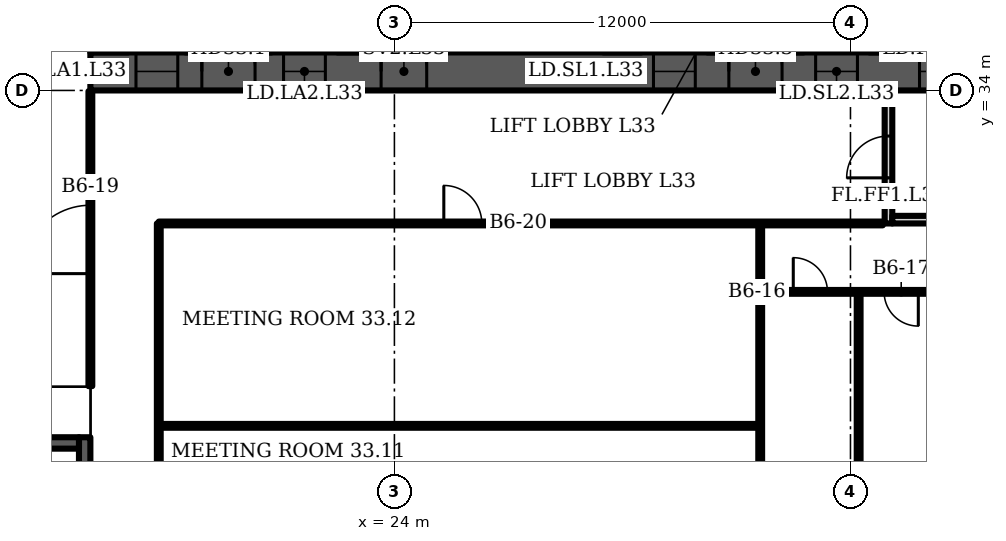
"""IFC4 building model, lengths in metres.
Left out: names, types, materials, properties, quantities, classifications, styles, units other than length and angle.
Written with IfcOpenShell. Run it as: python <this file> out.ifc"""

import sys

from ifc_helpers import new_model, si_unit, direction, frame, frame_2d, origin, place, context, subcontext, project, spatial, rectangle, extrude, element, fill, save


model = new_model("IFC4")
c1 = context("Model", 3, precision=1e-05, world=origin(), true_north=direction((0.0, 1.0)))
c2 = subcontext(c1, "Body", "Model", "MODEL_VIEW")
j1 = project(units=[si_unit("LENGTHUNIT", "METRE"), si_unit("PLANEANGLEUNIT", "RADIAN")], contexts=[c1])
p1 = place(None, origin())
s1 = spatial("IfcSite", under=j1, at=p1, CompositionType="ELEMENT")
p2 = place(p1, origin())
s2 = spatial("IfcBuilding", under=s1, at=p2, CompositionType="ELEMENT")
p3 = place(p2, frame((0.0, 0.0, 139.9)))
s3 = spatial("IfcBuildingStorey", under=s2, at=p3, CompositionType="ELEMENT", Elevation=139.9)
p4 = place(p3, frame((16.0, 34.5, 0.0), z_axis=(0.0, 0.0, 1.0), x_axis=(1.0, 0.0, 0.0)))
e1 = element("IfcWall", 1, at=p4, inside=s3, PredefinedType="SHEAR", context=c2, shape_type="SweptSolid", body=[
    extrude(rectangle(XDim=49.0, YDim=1.0, at=frame_2d((24.5, 0.0))), origin(), (0.0, 0.0, 1.0), 3.6),
])
p5 = place(p4, frame((1.2, 0.0, 0.0)))
e2 = element("IfcOpeningElement", 2, at=p5, cuts=e1, PredefinedType="OPENING", context=c2, shape_type="SweptSolid", body=[
    extrude(rectangle(XDim=1.1, YDim=2.1, at=frame_2d((0.55, 1.05))), frame((0.0, 0.51, 0.0), z_axis=(0.0, -1.0, 0.0), x_axis=(1.0, 0.0, 0.0)), (0.0, 0.0, 1.0), 1.02),
])
p6 = place(p4, frame((5.083, 0.0, 0.0)))
e3 = element("IfcOpeningElement", 3, at=p6, cuts=e1, PredefinedType="OPENING", context=c2, shape_type="SweptSolid", body=[
    extrude(rectangle(XDim=1.1, YDim=2.1, at=frame_2d((0.55, 1.05))), frame((0.0, 0.51, 0.0), z_axis=(0.0, -1.0, 0.0), x_axis=(1.0, 0.0, 0.0)), (0.0, 0.0, 1.0), 1.02),
])
p7 = place(p4, frame((2.933, 0.0, 0.0)))
e4 = element("IfcOpeningElement", 4, at=p7, cuts=e1, PredefinedType="OPENING", context=c2, shape_type="SweptSolid", body=[
    extrude(rectangle(XDim=1.4, YDim=2.1, at=frame_2d((0.7, 1.05))), frame((0.0, 0.51, 0.0), z_axis=(0.0, -1.0, 0.0), x_axis=(1.0, 0.0, 0.0)), (0.0, 0.0, 1.0), 1.02),
])
p8 = place(p4, frame((7.65, 0.0, 0.0)))
e5 = element("IfcOpeningElement", 5, at=p8, cuts=e1, PredefinedType="OPENING", context=c2, shape_type="SweptSolid", body=[
    extrude(rectangle(XDim=1.2, YDim=2.1, at=frame_2d((0.6, 1.05))), frame((0.0, 0.51, 0.0), z_axis=(0.0, -1.0, 0.0), x_axis=(1.0, 0.0, 0.0)), (0.0, 0.0, 1.0), 1.02),
])
p9 = place(p4, frame((14.817, 0.0, 0.0)))
e6 = element("IfcOpeningElement", 6, at=p9, cuts=e1, PredefinedType="OPENING", context=c2, shape_type="SweptSolid", body=[
    extrude(rectangle(XDim=1.1, YDim=2.1, at=frame_2d((0.55, 1.05))), frame((0.0, 0.51, 0.0), z_axis=(0.0, -1.0, 0.0), x_axis=(1.0, 0.0, 0.0)), (0.0, 0.0, 1.0), 1.02),
])
p10 = place(p4, frame((19.083, 0.0, 0.0)))
e7 = element("IfcOpeningElement", 7, at=p10, cuts=e1, PredefinedType="OPENING", context=c2, shape_type="SweptSolid", body=[
    extrude(rectangle(XDim=1.1, YDim=2.1, at=frame_2d((0.55, 1.05))), frame((0.0, 0.51, 0.0), z_axis=(0.0, -1.0, 0.0), x_axis=(1.0, 0.0, 0.0)), (0.0, 0.0, 1.0), 1.02),
])
p11 = place(p4, frame((16.8, 0.0, 0.0)))
e8 = element("IfcOpeningElement", 8, at=p11, cuts=e1, PredefinedType="OPENING", context=c2, shape_type="SweptSolid", body=[
    extrude(rectangle(XDim=1.4, YDim=2.1, at=frame_2d((0.7, 1.05))), frame((0.0, 0.51, 0.0), z_axis=(0.0, -1.0, 0.0), x_axis=(1.0, 0.0, 0.0)), (0.0, 0.0, 1.0), 1.02),
])
p12 = place(p4, frame((21.817, 0.0, 0.0)))
e9 = element("IfcOpeningElement", 9, at=p12, cuts=e1, PredefinedType="OPENING", context=c2, shape_type="SweptSolid", body=[
    extrude(rectangle(XDim=1.1, YDim=2.1, at=frame_2d((0.55, 1.05))), frame((0.0, 0.51, 0.0), z_axis=(0.0, -1.0, 0.0), x_axis=(1.0, 0.0, 0.0)), (0.0, 0.0, 1.0), 1.02),
])
p13 = place(p4, frame((26.083, 0.0, 0.0)))
e10 = element("IfcOpeningElement", 10, at=p13, cuts=e1, PredefinedType="OPENING", context=c2, shape_type="SweptSolid", body=[
    extrude(rectangle(XDim=1.1, YDim=2.1, at=frame_2d((0.55, 1.05))), frame((0.0, 0.51, 0.0), z_axis=(0.0, -1.0, 0.0), x_axis=(1.0, 0.0, 0.0)), (0.0, 0.0, 1.0), 1.02),
])
p14 = place(p4, frame((33.15, 0.0, 0.0)))
e11 = element("IfcOpeningElement", 11, at=p14, cuts=e1, PredefinedType="OPENING", context=c2, shape_type="SweptSolid", body=[
    extrude(rectangle(XDim=1.2, YDim=2.1, at=frame_2d((0.6, 1.05))), frame((0.0, 0.51, 0.0), z_axis=(0.0, -1.0, 0.0), x_axis=(1.0, 0.0, 0.0)), (0.0, 0.0, 1.0), 1.02),
])
p15 = place(p4, frame((37.8, 0.0, 0.0)))
e12 = element("IfcOpeningElement", 12, at=p15, cuts=e1, PredefinedType="OPENING", context=c2, shape_type="SweptSolid", body=[
    extrude(rectangle(XDim=1.4, YDim=2.1, at=frame_2d((0.7, 1.05))), frame((0.0, 0.51, 0.0), z_axis=(0.0, -1.0, 0.0), x_axis=(1.0, 0.0, 0.0)), (0.0, 0.0, 1.0), 1.02),
])
p16 = place(p4, frame((42.817, 0.0, 0.0)))
e13 = element("IfcOpeningElement", 13, at=p16, cuts=e1, PredefinedType="OPENING", context=c2, shape_type="SweptSolid", body=[
    extrude(rectangle(XDim=1.1, YDim=2.1, at=frame_2d((0.55, 1.05))), frame((0.0, 0.51, 0.0), z_axis=(0.0, -1.0, 0.0), x_axis=(1.0, 0.0, 0.0)), (0.0, 0.0, 1.0), 1.02),
])
p17 = place(p4, frame((46.7, 0.0, 0.0)))
e14 = element("IfcOpeningElement", 14, at=p17, cuts=e1, PredefinedType="OPENING", context=c2, shape_type="SweptSolid", body=[
    extrude(rectangle(XDim=1.1, YDim=2.1, at=frame_2d((0.55, 1.05))), frame((0.0, 0.51, 0.0), z_axis=(0.0, -1.0, 0.0), x_axis=(1.0, 0.0, 0.0)), (0.0, 0.0, 1.0), 1.02),
])
p18 = place(p4, frame((44.667, 0.0, 0.0)))
e15 = element("IfcOpeningElement", 15, at=p18, cuts=e1, PredefinedType="OPENING", context=c2, shape_type="SweptSolid", body=[
    extrude(rectangle(XDim=1.4, YDim=2.1, at=frame_2d((0.7, 1.05))), frame((0.0, 0.51, 0.0), z_axis=(0.0, -1.0, 0.0), x_axis=(1.0, 0.0, 0.0)), (0.0, 0.0, 1.0), 1.02),
])
p19 = place(p3, frame((37.0, 30.5, 0.0), z_axis=(0.0, 0.0, 1.0), x_axis=(0.0, 1.0, 0.0)))
e16 = element("IfcWall", 16, at=p19, inside=s3, PredefinedType="PARTITIONING", context=c2, shape_type="SweptSolid", body=[
    extrude(rectangle(XDim=3.5, YDim=0.2, at=frame_2d((1.75, 0.0))), origin(), (0.0, 0.0, 1.0), 3.2),
])
p20 = place(p19, frame((1.2, 0.0, 0.0)))
e17 = element("IfcOpeningElement", 17, at=p20, cuts=e16, PredefinedType="OPENING", context=c2, shape_type="SweptSolid", body=[
    extrude(rectangle(XDim=1.1, YDim=2.1, at=frame_2d((0.55, 1.05))), frame((0.0, 0.11, 0.0), z_axis=(0.0, -1.0, 0.0), x_axis=(1.0, 0.0, 0.0)), (0.0, 0.0, 1.0), 0.22),
])
p21 = place(p3, frame((37.1, 30.6, 0.0), z_axis=(0.0, 0.0, 1.0), x_axis=(1.0, 0.0, 0.0)))
e18 = element("IfcWall", 18, at=p21, inside=s3, PredefinedType="PARTITIONING", context=c2, shape_type="SweptSolid", body=[
    extrude(rectangle(XDim=2.8, YDim=0.2, at=frame_2d((1.4, 0.0))), origin(), (0.0, 0.0, 1.0), 3.2),
])
p22 = place(p3, frame((15.85, 20.525, 0.0), z_axis=(0.0, 0.0, 1.0), x_axis=(0.0, 1.0, 0.0)))
e19 = element("IfcWall", 19, at=p22, inside=s3, PredefinedType="SHEAR", context=c2, shape_type="SweptSolid", body=[
    extrude(rectangle(XDim=4.35, YDim=0.3, at=frame_2d((2.175, 0.0))), origin(), (0.0, 0.0, 1.0), 3.2),
])
p23 = place(p22, frame((1.575, 0.0, 0.0)))
e20 = element("IfcOpeningElement", 20, at=p23, cuts=e19, PredefinedType="OPENING", context=c2, shape_type="SweptSolid", body=[
    extrude(rectangle(XDim=1.2, YDim=2.1, at=frame_2d((0.6, 1.05))), frame((0.0, 0.16, 0.0), z_axis=(0.0, -1.0, 0.0), x_axis=(1.0, 0.0, 0.0)), (0.0, 0.0, 1.0), 0.32),
])
p24 = place(p3, frame((16.0, 26.22, 0.0), z_axis=(0.0, 0.0, 1.0), x_axis=(0.0, 1.0, 0.0)))
e21 = element("IfcWall", 21, at=p24, inside=s3, PredefinedType="PARTITIONING", context=c2, shape_type="SweptSolid", body=[
    extrude(rectangle(XDim=7.76, YDim=0.1, at=frame_2d((3.88, 0.0))), origin(), (0.0, 0.0, 1.0), 3.2),
])
p25 = place(p24, frame((2.96, 0.0, 0.0)))
e22 = element("IfcOpeningElement", 22, at=p25, cuts=e21, PredefinedType="OPENING", context=c2, shape_type="SweptSolid", body=[
    extrude(rectangle(XDim=1.8, YDim=2.1, at=frame_2d((0.9, 1.05))), frame((0.0, 0.06, 0.0), z_axis=(0.0, -1.0, 0.0), x_axis=(1.0, 0.0, 0.0)), (0.0, 0.0, 1.0), 0.12),
])
p26 = place(p3, frame((17.8, 23.935, 0.0), z_axis=(0.0, 0.0, 1.0), x_axis=(0.0, 1.0, 0.0)))
e23 = element("IfcWall", 23, at=p26, inside=s3, PredefinedType="PARTITIONING", context=c2, shape_type="SweptSolid", body=[
    extrude(rectangle(XDim=6.565, YDim=0.1, at=frame_2d((3.282, 0.0))), origin(), (0.0, 0.0, 1.0), 3.2),
])
p27 = place(p3, frame((17.8, 25.175, 0.0), z_axis=(0.0, 0.0, 1.0), x_axis=(1.0, 0.0, 0.0)))
e24 = element("IfcWall", 24, at=p27, inside=s3, PredefinedType="PARTITIONING", context=c2, shape_type="SweptSolid", body=[
    extrude(rectangle(XDim=15.825, YDim=0.1, at=frame_2d((7.913, 0.0))), origin(), (0.0, 0.0, 1.0), 3.2),
])
p28 = place(p3, frame((17.8, 30.5, 0.0), z_axis=(0.0, 0.0, 1.0), x_axis=(1.0, 0.0, 0.0)))
e25 = element("IfcWall", 25, at=p28, inside=s3, PredefinedType="PARTITIONING", context=c2, shape_type="SweptSolid", body=[
    extrude(rectangle(XDim=19.05, YDim=0.1, at=frame_2d((9.525, 0.0))), origin(), (0.0, 0.0, 1.0), 3.2),
])
p29 = place(p28, frame((7.5, 0.0, 0.0)))
e26 = element("IfcOpeningElement", 26, at=p29, cuts=e25, PredefinedType="OPENING", context=c2, shape_type="SweptSolid", body=[
    extrude(rectangle(XDim=1.0, YDim=2.1, at=frame_2d((0.5, 1.05))), frame((0.0, 0.06, 0.0), z_axis=(0.0, -1.0, 0.0), x_axis=(1.0, 0.0, 0.0)), (0.0, 0.0, 1.0), 0.12),
])
p30 = place(p3, frame((33.625, 14.53, 0.0), z_axis=(0.0, 0.0, 1.0), x_axis=(0.0, 1.0, 0.0)))
e27 = element("IfcWall", 27, at=p30, inside=s3, PredefinedType="PARTITIONING", context=c2, shape_type="SweptSolid", body=[
    extrude(rectangle(XDim=15.96, YDim=0.1, at=frame_2d((7.98, 0.0))), origin(), (0.0, 0.0, 1.0), 3.2),
])
p31 = place(p3, frame((33.625, 28.7, 0.0), z_axis=(0.0, 0.0, 1.0), x_axis=(1.0, 0.0, 0.0)))
e28 = element("IfcWall", 28, at=p31, inside=s3, PredefinedType="PARTITIONING", context=c2, shape_type="SweptSolid", body=[
    extrude(rectangle(XDim=6.875, YDim=0.1, at=frame_2d((3.438, 0.0))), origin(), (0.0, 0.0, 1.0), 3.2),
])
p32 = place(p31, frame((0.87, 0.0, 0.0)))
e29 = element("IfcOpeningElement", 29, at=p32, cuts=e28, PredefinedType="OPENING", context=c2, shape_type="SweptSolid", body=[
    extrude(rectangle(XDim=0.9, YDim=2.1, at=frame_2d((0.45, 1.05))), frame((0.0, 0.06, 0.0), z_axis=(0.0, -1.0, 0.0), x_axis=(1.0, 0.0, 0.0)), (0.0, 0.0, 1.0), 0.12),
])
p33 = place(p31, frame((3.26, 0.0, 0.0)))
e30 = element("IfcOpeningElement", 30, at=p33, cuts=e28, PredefinedType="OPENING", context=c2, shape_type="SweptSolid", body=[
    extrude(rectangle(XDim=0.9, YDim=2.1, at=frame_2d((0.45, 1.05))), frame((0.0, 0.06, 0.0), z_axis=(0.0, -1.0, 0.0), x_axis=(1.0, 0.0, 0.0)), (0.0, 0.0, 1.0), 0.12),
])
p34 = place(p31, frame((5.395, 0.0, 0.0)))
e31 = element("IfcOpeningElement", 31, at=p34, cuts=e28, PredefinedType="OPENING", context=c2, shape_type="SweptSolid", body=[
    extrude(rectangle(XDim=1.0, YDim=2.1, at=frame_2d((0.5, 1.05))), frame((0.0, 0.06, 0.0), z_axis=(0.0, -1.0, 0.0), x_axis=(1.0, 0.0, 0.0)), (0.0, 0.0, 1.0), 0.12),
])
p35 = place(p3, frame((36.215, 14.53, 0.0), z_axis=(0.0, 0.0, 1.0), x_axis=(0.0, 1.0, 0.0)))
e32 = element("IfcWall", 32, at=p35, inside=s3, PredefinedType="PARTITIONING", context=c2, shape_type="SweptSolid", body=[
    extrude(rectangle(XDim=14.17, YDim=0.1, at=frame_2d((7.085, 0.0))), origin(), (0.0, 0.0, 1.0), 3.2),
])
p36 = place(p3, frame((8.2, 24.725, 0.0), z_axis=(0.0, 0.0, 1.0), x_axis=(1.0, 0.0, 0.0)))
e33 = element("IfcWall", 33, at=p36, inside=s3, PredefinedType="SHEAR", context=c2, shape_type="SweptSolid", body=[
    extrude(rectangle(XDim=7.5, YDim=0.3, at=frame_2d((3.75, 0.0))), origin(), (0.0, 0.0, 1.0), 3.2),
])
p37 = place(p5, origin())
e34 = element("IfcDoor", 34, at=p37, inside=s3, OperationType="DOUBLE_DOOR_SLIDING", PredefinedType="DOOR", context=c2, shape_type="SweptSolid", body=[
    extrude(rectangle(XDim=1.1, YDim=2.1, at=frame_2d((0.55, 1.05))), frame((0.0, 0.025, 0.0), z_axis=(0.0, -1.0, 0.0), x_axis=(1.0, 0.0, 0.0)), (0.0, 0.0, 1.0), 0.05),
])
fill(e2, e34)
p38 = place(p6, origin())
e35 = element("IfcDoor", 35, at=p38, inside=s3, OperationType="DOUBLE_DOOR_SLIDING", PredefinedType="DOOR", context=c2, shape_type="SweptSolid", body=[
    extrude(rectangle(XDim=1.1, YDim=2.1, at=frame_2d((0.55, 1.05))), frame((0.0, 0.025, 0.0), z_axis=(0.0, -1.0, 0.0), x_axis=(1.0, 0.0, 0.0)), (0.0, 0.0, 1.0), 0.05),
])
fill(e3, e35)
p39 = place(p7, origin())
e36 = element("IfcDoor", 36, at=p39, inside=s3, OperationType="DOUBLE_DOOR_SINGLE_SWING", PredefinedType="DOOR", context=c2, shape_type="SweptSolid", body=[
    extrude(rectangle(XDim=1.4, YDim=2.1, at=frame_2d((0.7, 1.05))), frame((0.0, 0.025, 0.0), z_axis=(0.0, -1.0, 0.0), x_axis=(1.0, 0.0, 0.0)), (0.0, 0.0, 1.0), 0.05),
])
fill(e4, e36)
p40 = place(p8, origin())
e37 = element("IfcDoor", 37, at=p40, inside=s3, OperationType="SINGLE_SWING_LEFT", PredefinedType="DOOR", context=c2, shape_type="SweptSolid", body=[
    extrude(rectangle(XDim=1.2, YDim=2.1, at=frame_2d((0.6, 1.05))), frame((0.0, 0.025, 0.0), z_axis=(0.0, -1.0, 0.0), x_axis=(1.0, 0.0, 0.0)), (0.0, 0.0, 1.0), 0.05),
])
fill(e5, e37)
p41 = place(p9, origin())
e38 = element("IfcDoor", 38, at=p41, inside=s3, OperationType="DOUBLE_DOOR_SLIDING", PredefinedType="DOOR", context=c2, shape_type="SweptSolid", body=[
    extrude(rectangle(XDim=1.1, YDim=2.1, at=frame_2d((0.55, 1.05))), frame((0.0, 0.025, 0.0), z_axis=(0.0, -1.0, 0.0), x_axis=(1.0, 0.0, 0.0)), (0.0, 0.0, 1.0), 0.05),
])
fill(e6, e38)
p42 = place(p10, origin())
e39 = element("IfcDoor", 39, at=p42, inside=s3, OperationType="DOUBLE_DOOR_SLIDING", PredefinedType="DOOR", context=c2, shape_type="SweptSolid", body=[
    extrude(rectangle(XDim=1.1, YDim=2.1, at=frame_2d((0.55, 1.05))), frame((0.0, 0.025, 0.0), z_axis=(0.0, -1.0, 0.0), x_axis=(1.0, 0.0, 0.0)), (0.0, 0.0, 1.0), 0.05),
])
fill(e7, e39)
p43 = place(p11, origin())
e40 = element("IfcDoor", 40, at=p43, inside=s3, OperationType="DOUBLE_DOOR_SINGLE_SWING", PredefinedType="DOOR", context=c2, shape_type="SweptSolid", body=[
    extrude(rectangle(XDim=1.4, YDim=2.1, at=frame_2d((0.7, 1.05))), frame((0.0, 0.025, 0.0), z_axis=(0.0, -1.0, 0.0), x_axis=(1.0, 0.0, 0.0)), (0.0, 0.0, 1.0), 0.05),
])
fill(e8, e40)
p44 = place(p12, origin())
e41 = element("IfcDoor", 41, at=p44, inside=s3, OperationType="DOUBLE_DOOR_SLIDING", PredefinedType="DOOR", context=c2, shape_type="SweptSolid", body=[
    extrude(rectangle(XDim=1.1, YDim=2.1, at=frame_2d((0.55, 1.05))), frame((0.0, 0.025, 0.0), z_axis=(0.0, -1.0, 0.0), x_axis=(1.0, 0.0, 0.0)), (0.0, 0.0, 1.0), 0.05),
])
fill(e9, e41)
p45 = place(p20, origin())
e42 = element("IfcDoor", 42, at=p45, inside=s3, OperationType="SINGLE_SWING_LEFT", PredefinedType="DOOR", context=c2, shape_type="SweptSolid", body=[
    extrude(rectangle(XDim=1.1, YDim=2.1, at=frame_2d((0.55, 1.05))), frame((0.0, 0.025, 0.0), z_axis=(0.0, -1.0, 0.0), x_axis=(1.0, 0.0, 0.0)), (0.0, 0.0, 1.0), 0.05),
])
fill(e17, e42)
p46 = place(p32, origin())
e43 = element("IfcDoor", 43, at=p46, inside=s3, OperationType="SINGLE_SWING_LEFT", PredefinedType="DOOR", context=c2, shape_type="SweptSolid", body=[
    extrude(rectangle(XDim=0.9, YDim=2.1, at=frame_2d((0.45, 1.05))), frame((0.0, 0.025, 0.0), z_axis=(0.0, -1.0, 0.0), x_axis=(1.0, 0.0, 0.0)), (0.0, 0.0, 1.0), 0.05),
])
fill(e29, e43)
p47 = place(p33, origin())
e44 = element("IfcDoor", 44, at=p47, inside=s3, OperationType="SINGLE_SWING_RIGHT", PredefinedType="DOOR", context=c2, shape_type="SweptSolid", body=[
    extrude(rectangle(XDim=0.9, YDim=2.1, at=frame_2d((0.45, 1.05))), frame((0.0, 0.025, 0.0), z_axis=(0.0, -1.0, 0.0), x_axis=(1.0, 0.0, 0.0)), (0.0, 0.0, 1.0), 0.05),
])
fill(e30, e44)
p48 = place(p25, origin())
e45 = element("IfcDoor", 45, at=p48, inside=s3, OperationType="DOUBLE_DOOR_SINGLE_SWING", PredefinedType="DOOR", context=c2, shape_type="SweptSolid", body=[
    extrude(rectangle(XDim=1.8, YDim=2.1, at=frame_2d((0.9, 1.05))), frame((0.0, 0.025, 0.0), z_axis=(0.0, -1.0, 0.0), x_axis=(1.0, 0.0, 0.0)), (0.0, 0.0, 1.0), 0.05),
])
fill(e22, e45)
p49 = place(p29, origin())
e46 = element("IfcDoor", 46, at=p49, inside=s3, OperationType="SINGLE_SWING_LEFT", PredefinedType="DOOR", context=c2, shape_type="SweptSolid", body=[
    extrude(rectangle(XDim=1.0, YDim=2.1, at=frame_2d((0.5, 1.05))), frame((0.0, 0.025, 0.0), z_axis=(0.0, -1.0, 0.0), x_axis=(1.0, 0.0, 0.0)), (0.0, 0.0, 1.0), 0.05),
])
fill(e26, e46)
save(model, sys.argv[1])
